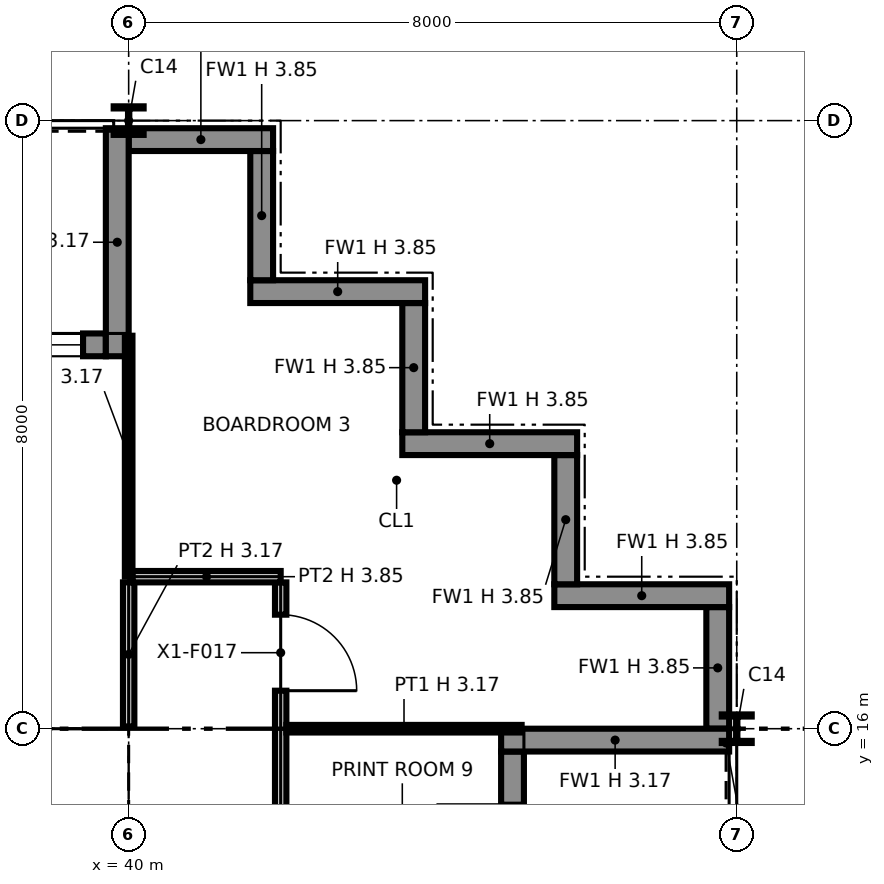
"""IFC4 building model, lengths in metres.
Left out: names, types, materials, properties, quantities, classifications, styles, units other than length and angle.
Written with IfcOpenShell. Run it as: python <this file> out.ifc"""

import sys

from ifc_helpers import new_model, si_unit, direction, frame, frame_2d, origin, origin_2d, place, context, subcontext, project, spatial, polyline, rectangle, i_section, outline, extrude, element, fill, save


model = new_model("IFC4")
c1 = context("Model", 3, precision=1e-05, world=origin(), true_north=direction((0.0, 1.0)))
c2 = subcontext(c1, "Body", "Model", "MODEL_VIEW")
j1 = project(units=[si_unit("LENGTHUNIT", "METRE"), si_unit("PLANEANGLEUNIT", "RADIAN")], contexts=[c1])
p1 = place(None, origin())
s1 = spatial("IfcSite", under=j1, at=p1, CompositionType="ELEMENT")
p2 = place(p1, origin())
s2 = spatial("IfcBuilding", under=s1, at=p2, CompositionType="ELEMENT")
p3 = place(p2, frame((0.0, 0.0, 255.0)))
s3 = spatial("IfcBuildingStorey", under=s2, at=p3, CompositionType="ELEMENT", Elevation=255.0)
p4 = place(p3, frame((40.0, 16.0, 0.0), z_axis=(0.0, 0.0, 1.0), x_axis=(1.0, 0.0, 0.0)))
e1 = element("IfcColumn", 1, at=p4, inside=s3, PredefinedType="COLUMN", context=c2, shape_type="SweptSolid", body=[
    extrude(i_section(OverallWidth=0.371, OverallDepth=0.361, WebThickness=0.012, FlangeThickness=0.02, at=origin_2d()), origin(), (0.0, 0.0, 1.0), 3.85),
])
for number, where, z_axis, x_axis in (
    (2, (40.0, 24.0, 0.0), (0.0, 0.0, 1.0), (1.0, 0.0, 0.0)),
    (3, (48.0, 16.0, 0.0), (0.0, 0.0, 1.0), (1.0, 0.0, 0.0)),
):
    element("IfcColumn", number, at=place(p3, frame(where, z_axis=z_axis, x_axis=x_axis)), inside=s3, PredefinedType="COLUMN", context=c2, shape_type="SweptSolid", body=[
        extrude(i_section(OverallWidth=0.394, OverallDepth=0.376, WebThickness=0.017, FlangeThickness=0.028, at=origin_2d()), origin(), (0.0, 0.0, 1.0), 3.85),
    ])
p5 = place(p3, frame((45.05, 8.3, 0.0), z_axis=(0.0, 0.0, 1.0), x_axis=(0.0, 1.0, 0.0)))
e4 = element("IfcWall", 4, at=p5, inside=s3, PredefinedType="SOLIDWALL", context=c2, shape_type="SweptSolid", body=[
    extrude(rectangle(XDim=7.4, YDim=0.3, at=frame_2d((3.7, 0.0))), origin(), (0.0, 0.0, 1.0), 3.85),
])
p6 = place(p5, frame((0.3, 0.0, 0.9)))
e5 = element("IfcOpeningElement", 5, at=p6, cuts=e4, PredefinedType="OPENING", context=c2, shape_type="SweptSolid", body=[
    extrude(rectangle(XDim=2.8, YDim=2.2, at=frame_2d((1.4, 1.1))), frame((0.0, 0.16, 0.0), z_axis=(0.0, -1.0, 0.0), x_axis=(1.0, 0.0, 0.0)), (0.0, 0.0, 1.0), 0.32),
])
p7 = place(p5, frame((4.7, 0.0, 0.0)))
e6 = element("IfcOpeningElement", 6, at=p7, cuts=e4, PredefinedType="OPENING", context=c2, shape_type="SweptSolid", body=[
    extrude(rectangle(XDim=2.0, YDim=2.4, at=frame_2d((1.0, 1.2))), frame((0.0, 0.16, 0.0), z_axis=(0.0, -1.0, 0.0), x_axis=(1.0, 0.0, 0.0)), (0.0, 0.0, 1.0), 0.32),
])
p8 = place(p3, frame((47.9, 15.85, 0.0), z_axis=(0.0, 0.0, 1.0), x_axis=(-1.0, 0.0, 0.0)))
e7 = element("IfcWall", 7, at=p8, inside=s3, PredefinedType="SOLIDWALL", context=c2, shape_type="SweptSolid", body=[
    extrude(rectangle(XDim=3.0, YDim=0.3, at=frame_2d((1.5, 0.0))), origin(), (0.0, 0.0, 1.0), 3.171),
])
p9 = place(p3, frame((47.75, 16.0, 0.0), z_axis=(0.0, 0.0, 1.0), x_axis=(0.0, 1.0, 0.0)))
e8 = element("IfcWall", 8, at=p9, inside=s3, PredefinedType="SOLIDWALL", context=c2, shape_type="SweptSolid", body=[
    extrude(rectangle(XDim=1.6, YDim=0.3, at=frame_2d((0.8, 0.0))), origin(), (0.0, 0.0, 1.0), 3.85),
])
p10 = place(p3, frame((47.9, 17.75, 0.0), z_axis=(0.0, 0.0, 1.0), x_axis=(-1.0, 0.0, 0.0)))
e9 = element("IfcWall", 9, at=p10, inside=s3, PredefinedType="SOLIDWALL", context=c2, shape_type="SweptSolid", body=[
    extrude(rectangle(XDim=2.3, YDim=0.3, at=frame_2d((1.15, 0.0))), origin(), (0.0, 0.0, 1.0), 3.85),
])
p11 = place(p3, frame((45.75, 17.9, 0.0), z_axis=(0.0, 0.0, 1.0), x_axis=(0.0, 1.0, 0.0)))
e10 = element("IfcWall", 10, at=p11, inside=s3, PredefinedType="SOLIDWALL", context=c2, shape_type="SweptSolid", body=[
    extrude(rectangle(XDim=1.7, YDim=0.3, at=frame_2d((0.85, 0.0))), origin(), (0.0, 0.0, 1.0), 3.85),
])
p12 = place(p3, frame((45.9, 19.75, 0.0), z_axis=(0.0, 0.0, 1.0), x_axis=(-1.0, 0.0, 0.0)))
e11 = element("IfcWall", 11, at=p12, inside=s3, PredefinedType="SOLIDWALL", context=c2, shape_type="SweptSolid", body=[
    extrude(rectangle(XDim=2.3, YDim=0.3, at=frame_2d((1.15, 0.0))), origin(), (0.0, 0.0, 1.0), 3.85),
])
p13 = place(p3, frame((43.75, 19.9, 0.0), z_axis=(0.0, 0.0, 1.0), x_axis=(0.0, 1.0, 0.0)))
e12 = element("IfcWall", 12, at=p13, inside=s3, PredefinedType="SOLIDWALL", context=c2, shape_type="SweptSolid", body=[
    extrude(rectangle(XDim=1.7, YDim=0.3, at=frame_2d((0.85, 0.0))), origin(), (0.0, 0.0, 1.0), 3.85),
])
p14 = place(p3, frame((43.9, 21.75, 0.0), z_axis=(0.0, 0.0, 1.0), x_axis=(-1.0, 0.0, 0.0)))
e13 = element("IfcWall", 13, at=p14, inside=s3, PredefinedType="SOLIDWALL", context=c2, shape_type="SweptSolid", body=[
    extrude(rectangle(XDim=2.3, YDim=0.3, at=frame_2d((1.15, 0.0))), origin(), (0.0, 0.0, 1.0), 3.85),
])
p15 = place(p3, frame((41.75, 21.9, 0.0), z_axis=(0.0, 0.0, 1.0), x_axis=(0.0, 1.0, 0.0)))
e14 = element("IfcWall", 14, at=p15, inside=s3, PredefinedType="SOLIDWALL", context=c2, shape_type="SweptSolid", body=[
    extrude(rectangle(XDim=1.7, YDim=0.3, at=frame_2d((0.85, 0.0))), origin(), (0.0, 0.0, 1.0), 3.85),
])
p16 = place(p3, frame((41.9, 23.75, 0.0), z_axis=(0.0, 0.0, 1.0), x_axis=(-1.0, 0.0, 0.0)))
e15 = element("IfcWall", 15, at=p16, inside=s3, PredefinedType="SOLIDWALL", context=c2, shape_type="SweptSolid", body=[
    extrude(rectangle(XDim=1.9, YDim=0.3, at=frame_2d((0.95, 0.0))), origin(), (0.0, 0.0, 1.0), 3.85),
])
p17 = place(p3, frame((39.7, 21.05, 0.0), z_axis=(0.0, 0.0, 1.0), x_axis=(-1.0, 0.0, 0.0)))
e16 = element("IfcWall", 16, at=p17, inside=s3, PredefinedType="SOLIDWALL", context=c2, shape_type="SweptSolid", body=[
    extrude(rectangle(XDim=7.4, YDim=0.3, at=frame_2d((3.7, 0.0))), origin(), (0.0, 0.0, 1.0), 3.85),
])
p18 = place(p17, frame((0.3, 0.0, 0.9)))
e17 = element("IfcOpeningElement", 17, at=p18, cuts=e16, PredefinedType="OPENING", context=c2, shape_type="SweptSolid", body=[
    extrude(rectangle(XDim=2.8, YDim=2.2, at=frame_2d((1.4, 1.1))), frame((0.0, 0.16, 0.0), z_axis=(0.0, -1.0, 0.0), x_axis=(1.0, 0.0, 0.0)), (0.0, 0.0, 1.0), 0.32),
])
p19 = place(p17, frame((4.7, 0.0, 0.0)))
e18 = element("IfcOpeningElement", 18, at=p19, cuts=e16, PredefinedType="OPENING", context=c2, shape_type="SweptSolid", body=[
    extrude(rectangle(XDim=2.0, YDim=2.4, at=frame_2d((1.0, 1.2))), frame((0.0, 0.16, 0.0), z_axis=(0.0, -1.0, 0.0), x_axis=(1.0, 0.0, 0.0)), (0.0, 0.0, 1.0), 0.32),
])
p20 = place(p3, frame((39.85, 23.9, 0.0), z_axis=(0.0, 0.0, 1.0), x_axis=(0.0, -1.0, 0.0)))
e19 = element("IfcWall", 19, at=p20, inside=s3, PredefinedType="SOLIDWALL", context=c2, shape_type="SweptSolid", body=[
    extrude(rectangle(XDim=3.0, YDim=0.3, at=frame_2d((1.5, 0.0))), origin(), (0.0, 0.0, 1.0), 3.171),
])
p21 = place(p3, frame((24.65, 15.25, 0.0), z_axis=(0.0, 0.0, 1.0), x_axis=(1.0, 0.0, 0.0)))
e20 = element("IfcWall", 20, at=p21, inside=s3, PredefinedType="PARTITIONING", context=c2, shape_type="SweptSolid", body=[
    extrude(outline(polyline([(0.0, 0.0), (14.7, 0.0), (14.7, 3.85), (7.438, 3.85), (7.438, 3.308), (7.262, 3.308), (7.261, 3.85), (0.0, 3.85), (0.0, 0.0)])), frame((0.0, 0.1, 0.0), z_axis=(0.0, -1.0, 0.0), x_axis=(1.0, 0.0, 0.0)), (0.0, 0.0, 1.0), 0.2),
])
p22 = place(p21, frame((2.85, 0.0, 0.0)))
e21 = element("IfcOpeningElement", 21, at=p22, cuts=e20, PredefinedType="OPENING", context=c2, shape_type="SweptSolid", body=[
    extrude(rectangle(XDim=1.8, YDim=2.1, at=frame_2d((0.9, 1.05))), frame((0.0, 0.11, 0.0), z_axis=(0.0, -1.0, 0.0), x_axis=(1.0, 0.0, 0.0)), (0.0, 0.0, 1.0), 0.22),
])
p23 = place(p21, frame((9.95, 0.0, 0.0), z_axis=(0.0, 0.0, 1.0), x_axis=(-1.0, 0.0, 0.0)))
e22 = element("IfcOpeningElement", 22, at=p23, cuts=e20, PredefinedType="OPENING", context=c2, shape_type="SweptSolid", body=[
    extrude(rectangle(XDim=1.4, YDim=2.1, at=frame_2d((0.7, 1.05))), frame((0.0, 0.11, 0.0), z_axis=(0.0, -1.0, 0.0), x_axis=(1.0, 0.0, 0.0)), (0.0, 0.0, 1.0), 0.22),
])
p24 = place(p21, frame((13.4, 0.0, 0.0), z_axis=(0.0, 0.0, 1.0), x_axis=(-1.0, 0.0, 0.0)))
e23 = element("IfcOpeningElement", 23, at=p24, cuts=e20, PredefinedType="OPENING", context=c2, shape_type="SweptSolid", body=[
    extrude(rectangle(XDim=1.4, YDim=2.1, at=frame_2d((0.7, 1.05))), frame((0.0, 0.11, 0.0), z_axis=(0.0, -1.0, 0.0), x_axis=(1.0, 0.0, 0.0)), (0.0, 0.0, 1.0), 0.22),
])
p25 = place(p3, frame((39.25, 8.85, 0.0), z_axis=(0.0, 0.0, 1.0), x_axis=(0.0, 1.0, 0.0)))
e24 = element("IfcWall", 24, at=p25, inside=s3, PredefinedType="PARTITIONING", context=c2, shape_type="SweptSolid", body=[
    extrude(rectangle(XDim=6.3, YDim=0.2, at=frame_2d((3.15, 0.0))), origin(), (0.0, 0.0, 1.0), 3.85),
])
p26 = place(p3, frame((42.0, 6.0, 0.0), z_axis=(0.0, 0.0, 1.0), x_axis=(0.0, 1.0, 0.0)))
e25 = element("IfcWall", 25, at=p26, inside=s3, PredefinedType="PARTITIONING", context=c2, shape_type="SweptSolid", body=[
    extrude(outline(polyline([(0.0, 0.0), (11.925, 0.0), (11.925, 3.85), (10.3, 3.85), (10.298, 3.172), (9.702, 3.172), (9.7, 3.85), (6.3, 3.85), (6.298, 3.172), (5.702, 3.172), (5.7, 3.85), (2.3, 3.85), (2.298, 3.172), (1.702, 3.172), (1.7, 3.85), (0.0, 3.85), (0.0, 0.0)])), frame((0.0, 0.075, 0.0), z_axis=(0.0, -1.0, 0.0), x_axis=(1.0, 0.0, 0.0)), (0.0, 0.0, 1.0), 0.15),
])
p27 = place(p26, frame((4.5, 0.0, 0.0), z_axis=(0.0, 0.0, 1.0), x_axis=(-1.0, 0.0, 0.0)))
e26 = element("IfcOpeningElement", 26, at=p27, cuts=e25, PredefinedType="OPENING", context=c2, shape_type="SweptSolid", body=[
    extrude(rectangle(XDim=1.0, YDim=2.1, at=frame_2d((0.5, 1.05))), frame((0.0, 0.085, 0.0), z_axis=(0.0, -1.0, 0.0), x_axis=(1.0, 0.0, 0.0)), (0.0, 0.0, 1.0), 0.17),
])
p28 = place(p26, frame((8.5, 0.0, 0.0), z_axis=(0.0, 0.0, 1.0), x_axis=(-1.0, 0.0, 0.0)))
e27 = element("IfcOpeningElement", 27, at=p28, cuts=e25, PredefinedType="OPENING", context=c2, shape_type="SweptSolid", body=[
    extrude(rectangle(XDim=1.0, YDim=2.1, at=frame_2d((0.5, 1.05))), frame((0.0, 0.085, 0.0), z_axis=(0.0, -1.0, 0.0), x_axis=(1.0, 0.0, 0.0)), (0.0, 0.0, 1.0), 0.17),
])
p29 = place(p26, frame((11.5, 0.0, 0.0), z_axis=(0.0, 0.0, 1.0), x_axis=(-1.0, 0.0, 0.0)))
e28 = element("IfcOpeningElement", 28, at=p29, cuts=e25, PredefinedType="OPENING", context=c2, shape_type="SweptSolid", body=[
    extrude(rectangle(XDim=1.0, YDim=2.1, at=frame_2d((0.5, 1.05))), frame((0.0, 0.085, 0.0), z_axis=(0.0, -1.0, 0.0), x_axis=(1.0, 0.0, 0.0)), (0.0, 0.0, 1.0), 0.17),
])
p30 = place(p3, frame((42.075, 16.0, 0.0), z_axis=(0.0, 0.0, 1.0), x_axis=(1.0, 0.0, 0.0)))
e29 = element("IfcWall", 29, at=p30, inside=s3, PredefinedType="PARTITIONING", context=c2, shape_type="SweptSolid", body=[
    extrude(rectangle(XDim=3.095, YDim=0.1, at=frame_2d((1.547, 0.0))), origin(), (0.0, 0.0, 1.0), 3.172),
])
p31 = place(p3, frame((40.0, 16.03, 0.0), z_axis=(0.0, 0.0, 1.0), x_axis=(0.0, 1.0, 0.0)))
e30 = element("IfcWall", 30, at=p31, inside=s3, PredefinedType="PARTITIONING", context=c2, shape_type="SweptSolid", body=[
    extrude(rectangle(XDim=1.895, YDim=0.15, at=frame_2d((0.948, 0.0))), origin(), (0.0, 0.0, 1.0), 3.172),
])
p32 = place(p3, frame((40.05, 18.0, 0.0), z_axis=(0.0, 0.0, 1.0), x_axis=(1.0, 0.0, 0.0)))
e31 = element("IfcWall", 31, at=p32, inside=s3, PredefinedType="PARTITIONING", context=c2, shape_type="SweptSolid", body=[
    extrude(rectangle(XDim=1.95, YDim=0.15, at=frame_2d((0.975, 0.0))), origin(), (0.0, 0.0, 1.0), 3.85),
])
p33 = place(p3, frame((40.0, 18.0, 0.0), z_axis=(0.0, 0.0, 1.0), x_axis=(0.0, 1.0, 0.0)))
e32 = element("IfcWall", 32, at=p33, inside=s3, PredefinedType="PARTITIONING", context=c2, shape_type="SweptSolid", body=[
    extrude(rectangle(XDim=3.17, YDim=0.1, at=frame_2d((1.585, 0.0))), origin(), (0.0, 0.0, 1.0), 3.172),
])
p34 = place(p18, origin())
e33 = element("IfcWindow", 33, at=p34, inside=s3, PartitioningType="SINGLE_PANEL", PredefinedType="WINDOW", context=c2, shape_type="SweptSolid", body=[
    extrude(rectangle(XDim=2.8, YDim=2.2, at=frame_2d((1.4, 1.1))), frame((0.0, 0.03, 0.0), z_axis=(0.0, -1.0, 0.0), x_axis=(1.0, 0.0, 0.0)), (0.0, 0.0, 1.0), 0.06),
])
fill(e17, e33)
p35 = place(p29, origin())
e34 = element("IfcDoor", 34, at=p35, inside=s3, OperationType="SINGLE_SWING_RIGHT", PredefinedType="DOOR", context=c2, shape_type="SweptSolid", body=[
    extrude(rectangle(XDim=1.0, YDim=2.1, at=frame_2d((0.5, 1.05))), frame((0.0, 0.025, 0.0), z_axis=(0.0, -1.0, 0.0), x_axis=(1.0, 0.0, 0.0)), (0.0, 0.0, 1.0), 0.05),
])
fill(e28, e34)
save(model, sys.argv[1])
